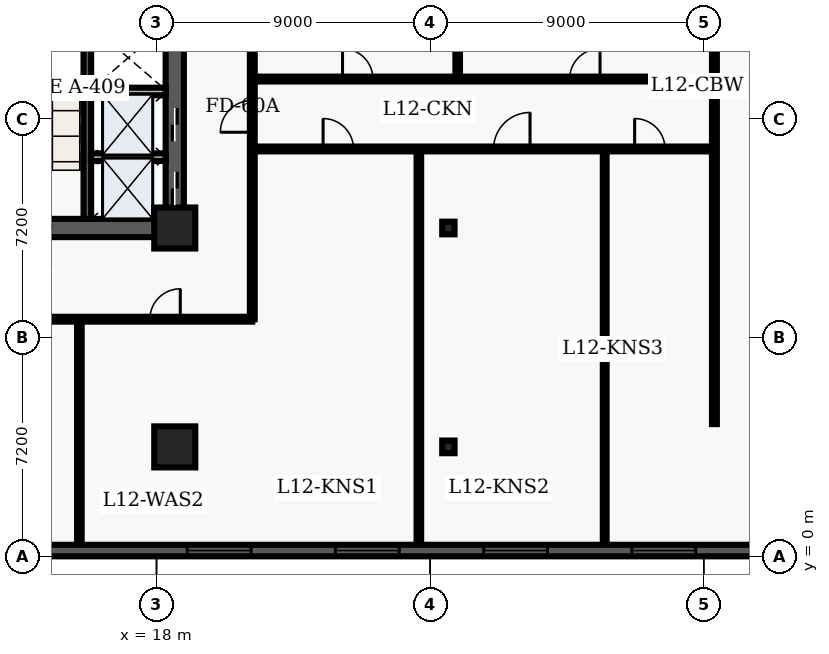
"""IFC4 building model, lengths in metres.
Left out: names, types, materials, properties, quantities, classifications, styles, units other than length and angle.
Written with IfcOpenShell. Run it as: python <this file> out.ifc"""

import sys

from ifc_helpers import new_model, entity, si_unit, converted_unit, direction, frame, origin_with_axes, origin_2d_with_axis, place, context, subcontext, project, spatial, polyline, rectangle, i_section, outline, extrude, element, fill, save


model = new_model("IFC4")
c1 = context("Model", 3, precision=1e-05, world=origin_with_axes(), true_north=direction((0.0, 1.0)))
c2 = subcontext(c1, "Body", "Model", "MODEL_VIEW")
j1 = project(units=[si_unit("LENGTHUNIT", "METRE"), converted_unit("PLANEANGLEUNIT", "DEGREE", entity("IfcPlaneAngleMeasure", 0.017), si_unit("PLANEANGLEUNIT", "RADIAN"), dimensions=[0, 0, 0, 0, 0, 0, 0])], contexts=[c1])
p1 = place(None, origin_with_axes())
s1 = spatial("IfcSite", under=j1, at=p1, CompositionType="ELEMENT")
p2 = place(p1, origin_with_axes())
s2 = spatial("IfcBuilding", under=s1, at=p2, CompositionType="ELEMENT")
p3 = place(p2, frame((0.0, 0.0, 52.2), z_axis=(0.0, 0.0, 1.0), x_axis=(1.0, 0.0, 0.0)))
s3 = spatial("IfcBuildingStorey", under=s2, at=p3, CompositionType="ELEMENT", Elevation=52.2)
p4 = place(p3, frame((11.4, 10.8, 0.0), z_axis=(0.0, 0.0, 1.0), x_axis=(1.0, 0.0, 0.0)))
e1 = element("IfcWall", 1, at=p4, inside=s3, PredefinedType="SHEAR", context=c2, shape_type="SweptSolid", body=[
    extrude(outline(polyline([(0.0, -0.3), (7.2, -0.3), (7.2, 0.3), (0.0, 0.3), (0.0, -0.3)])), origin_with_axes(), (0.0, 0.0, 1.0), 3.66),
])
p5 = place(p4, frame((2.625, 0.0, 0.0), z_axis=(0.0, 0.0, 1.0), x_axis=(1.0, 0.0, 0.0)))
e2 = element("IfcOpeningElement", 2, at=p5, cuts=e1, PredefinedType="OPENING", context=c2, shape_type="SweptSolid", body=[
    extrude(rectangle(XDim=1.05, YDim=0.62, at=origin_2d_with_axis()), origin_with_axes(), (0.0, 0.0, 1.0), 2.15),
])
p6 = place(p3, frame((18.6, 10.8, 0.0), z_axis=(0.0, 0.0, 1.0), x_axis=(0.0, 1.0, 0.0)))
e3 = element("IfcWall", 3, at=p6, inside=s3, PredefinedType="SHEAR", context=c2, shape_type="SweptSolid", body=[
    extrude(outline(polyline([(0.0, -0.3), (13.5, -0.3), (13.5, 0.3), (0.0, 0.3), (0.0, -0.3)])), origin_with_axes(), (0.0, 0.0, 1.0), 3.66),
])
p7 = place(p6, frame((1.3, 0.0, 0.0), z_axis=(0.0, 0.0, 1.0), x_axis=(1.0, 0.0, 0.0)))
e4 = element("IfcOpeningElement", 4, at=p7, cuts=e3, PredefinedType="OPENING", context=c2, shape_type="SweptSolid", body=[
    extrude(rectangle(XDim=1.1, YDim=0.62, at=origin_2d_with_axis()), origin_with_axes(), (0.0, 0.0, 1.0), 2.15),
])
p8 = place(p6, frame((3.4, 0.0, 0.0), z_axis=(0.0, 0.0, 1.0), x_axis=(1.0, 0.0, 0.0)))
e5 = element("IfcOpeningElement", 5, at=p8, cuts=e3, PredefinedType="OPENING", context=c2, shape_type="SweptSolid", body=[
    extrude(rectangle(XDim=1.1, YDim=0.62, at=origin_2d_with_axis()), origin_with_axes(), (0.0, 0.0, 1.0), 2.15),
])
p9 = place(p6, frame((11.125, 0.0, 0.0), z_axis=(0.0, 0.0, 1.0), x_axis=(1.0, 0.0, 0.0)))
e6 = element("IfcOpeningElement", 6, at=p9, cuts=e3, PredefinedType="OPENING", context=c2, shape_type="SweptSolid", body=[
    extrude(rectangle(XDim=1.05, YDim=0.62, at=origin_2d_with_axis()), origin_with_axes(), (0.0, 0.0, 1.0), 2.15),
])
p10 = place(p3, frame((15.725, 11.1, 0.0), z_axis=(0.0, 0.0, 1.0), x_axis=(0.0, 1.0, 0.0)))
e7 = element("IfcWall", 7, at=p10, inside=s3, PredefinedType="SHEAR", context=c2, shape_type="SweptSolid", body=[
    extrude(outline(polyline([(0.0, -0.125), (8.6, -0.125), (8.6, 0.125), (0.0, 0.125), (0.0, -0.125)])), origin_with_axes(), (0.0, 0.0, 1.0), 3.66),
])
for number, where, z_axis, x_axis in (
    (8, (18.6, 3.6, 0.0), (0.0, 0.0, 1.0), (1.0, 0.0, 0.0)),
    (9, (18.6, 10.8, 0.0), (0.0, 0.0, 1.0), (1.0, 0.0, 0.0)),
):
    element("IfcColumn", number, at=place(p3, frame(where, z_axis=z_axis, x_axis=x_axis)), inside=s3, PredefinedType="COLUMN", context=c2, shape_type="SweptSolid", body=[
        extrude(rectangle(XDim=1.35, YDim=1.35, at=origin_2d_with_axis()), origin_with_axes(), (0.0, 0.0, 1.0), 3.9),
    ])
for number, where, z_axis, x_axis in (
    (10, (27.6, 3.6, 0.0), (0.0, 0.0, 1.0), (1.0, 0.0, 0.0)),
    (11, (27.6, 10.8, 0.0), (0.0, 0.0, 1.0), (1.0, 0.0, 0.0)),
):
    element("IfcColumn", number, at=place(p3, frame(where, z_axis=z_axis, x_axis=x_axis)), inside=s3, PredefinedType="COLUMN", context=c2, shape_type="SweptSolid", body=[
        extrude(i_section(OverallWidth=0.406, OverallDepth=0.416, WebThickness=0.03, FlangeThickness=0.048, FilletRadius=0.022, at=origin_2d_with_axis()), origin_with_axes(), (0.0, 0.0, 1.0), 3.9),
    ])
for number, where, z_axis, x_axis in (
    (12, (15.84, 13.13, 0.0), (0.0, 0.0, 1.0), (1.0, 0.0, 0.0)),
    (13, (15.84, 15.29, 0.0), (0.0, 0.0, 1.0), (1.0, 0.0, 0.0)),
):
    element("IfcWall", number, at=place(p3, frame(where, z_axis=z_axis, x_axis=x_axis)), inside=s3, PredefinedType="SOLIDWALL", context=c2, shape_type="SweptSolid", body=[
        extrude(outline(polyline([(0.0, -0.125), (2.46, -0.125), (2.46, 0.125), (0.0, 0.125), (0.0, -0.125)])), origin_with_axes(), (0.0, 0.0, 1.0), 2.7),
    ])
p11 = place(p3, frame((2.6, 7.8, 0.0), z_axis=(0.0, 0.0, 1.0), x_axis=(1.0, 0.0, 0.0)))
e14 = element("IfcWall", 14, at=p11, inside=s3, PredefinedType="PARTITIONING", context=c2, shape_type="SweptSolid", body=[
    extrude(outline(polyline([(0.0, -0.08), (18.55, -0.08), (18.55, 0.08), (0.0, 0.08), (0.0, -0.08)])), origin_with_axes(), (0.0, 0.0, 1.0), 2.7),
])
p12 = place(p11, frame((6.426, 0.0, 0.0), z_axis=(0.0, 0.0, 1.0), x_axis=(1.0, 0.0, 0.0)))
e15 = element("IfcOpeningElement", 15, at=p12, cuts=e14, PredefinedType="OPENING", context=c2, shape_type="SweptSolid", body=[
    extrude(rectangle(XDim=1.2, YDim=0.18, at=origin_2d_with_axis()), origin_with_axes(), (0.0, 0.0, 1.0), 2.2),
])
p13 = place(p11, frame((15.681, 0.0, 0.0), z_axis=(0.0, 0.0, 1.0), x_axis=(1.0, 0.0, 0.0)))
e16 = element("IfcOpeningElement", 16, at=p13, cuts=e14, PredefinedType="OPENING", context=c2, shape_type="SweptSolid", body=[
    extrude(rectangle(XDim=1.0, YDim=0.18, at=origin_2d_with_axis()), origin_with_axes(), (0.0, 0.0, 1.0), 2.15),
])
p14 = place(p3, frame((21.15, 7.8, 0.0), z_axis=(0.0, 0.0, 1.0), x_axis=(0.0, 1.0, 0.0)))
e17 = element("IfcWall", 17, at=p14, inside=s3, PredefinedType="PARTITIONING", context=c2, shape_type="SweptSolid", body=[
    extrude(outline(polyline([(0.0, -0.08), (32.7, -0.08), (32.7, 0.08), (0.0, 0.08), (0.0, -0.08)])), origin_with_axes(), (0.0, 0.0, 1.0), 2.7),
])
p15 = place(p14, frame((6.675, 0.0, 0.0), z_axis=(0.0, 0.0, 1.0), x_axis=(1.0, 0.0, 0.0)))
e18 = element("IfcOpeningElement", 18, at=p15, cuts=e17, PredefinedType="OPENING", context=c2, shape_type="SweptSolid", body=[
    extrude(rectangle(XDim=1.05, YDim=0.18, at=origin_2d_with_axis()), origin_with_axes(), (0.0, 0.0, 1.0), 2.15),
])
p16 = place(p3, frame((15.463, 0.36, 0.0), z_axis=(0.0, 0.0, 1.0), x_axis=(0.0, 1.0, 0.0)))
e19 = element("IfcWall", 19, at=p16, inside=s3, PredefinedType="PARTITIONING", context=c2, shape_type="SweptSolid", body=[
    extrude(outline(polyline([(0.0, -0.075), (7.34, -0.075), (7.34, 0.075), (0.0, 0.075), (0.0, -0.075)])), origin_with_axes(), (0.0, 0.0, 1.0), 2.7),
])
p17 = place(p3, frame((21.15, 13.4, 0.0), z_axis=(0.0, 0.0, 1.0), x_axis=(1.0, 0.0, 0.0)))
e20 = element("IfcWall", 20, at=p17, inside=s3, PredefinedType="PARTITIONING", context=c2, shape_type="SweptSolid", body=[
    extrude(outline(polyline([(0.0, -0.08), (15.2, -0.08), (15.2, 0.08), (0.0, 0.08), (0.0, -0.08)])), origin_with_axes(), (0.0, 0.0, 1.0), 2.7),
])
p18 = place(p17, frame((2.829, 0.0, 0.0), z_axis=(0.0, 0.0, 1.0), x_axis=(1.0, 0.0, 0.0)))
e21 = element("IfcOpeningElement", 21, at=p18, cuts=e20, PredefinedType="OPENING", context=c2, shape_type="SweptSolid", body=[
    extrude(rectangle(XDim=1.0, YDim=0.18, at=origin_2d_with_axis()), origin_with_axes(), (0.0, 0.0, 1.0), 2.15),
])
p19 = place(p17, frame((8.536, 0.0, 0.0), z_axis=(0.0, 0.0, 1.0), x_axis=(1.0, 0.0, 0.0)))
e22 = element("IfcOpeningElement", 22, at=p19, cuts=e20, PredefinedType="OPENING", context=c2, shape_type="SweptSolid", body=[
    extrude(rectangle(XDim=1.2, YDim=0.18, at=origin_2d_with_axis()), origin_with_axes(), (0.0, 0.0, 1.0), 2.2),
])
p20 = place(p17, frame((13.076, 0.0, 0.0), z_axis=(0.0, 0.0, 1.0), x_axis=(1.0, 0.0, 0.0)))
e23 = element("IfcOpeningElement", 23, at=p20, cuts=e20, PredefinedType="OPENING", context=c2, shape_type="SweptSolid", body=[
    extrude(rectangle(XDim=1.0, YDim=0.18, at=origin_2d_with_axis()), origin_with_axes(), (0.0, 0.0, 1.0), 2.15),
])
p21 = place(p3, frame((21.15, 15.7, 0.0), z_axis=(0.0, 0.0, 1.0), x_axis=(1.0, 0.0, 0.0)))
e24 = element("IfcWall", 24, at=p21, inside=s3, PredefinedType="PARTITIONING", context=c2, shape_type="SweptSolid", body=[
    extrude(outline(polyline([(0.0, -0.08), (15.2, -0.08), (15.2, 0.08), (0.0, 0.08), (0.0, -0.08)])), origin_with_axes(), (0.0, 0.0, 1.0), 2.7),
])
p22 = place(p21, frame((3.468, 0.0, 0.0), z_axis=(0.0, 0.0, 1.0), x_axis=(1.0, 0.0, 0.0)))
e25 = element("IfcOpeningElement", 25, at=p22, cuts=e24, PredefinedType="OPENING", context=c2, shape_type="SweptSolid", body=[
    extrude(rectangle(XDim=1.0, YDim=0.18, at=origin_2d_with_axis()), origin_with_axes(), (0.0, 0.0, 1.0), 2.15),
])
p23 = place(p21, frame((10.938, 0.0, 0.0), z_axis=(0.0, 0.0, 1.0), x_axis=(1.0, 0.0, 0.0)))
e26 = element("IfcOpeningElement", 26, at=p23, cuts=e24, PredefinedType="OPENING", context=c2, shape_type="SweptSolid", body=[
    extrude(rectangle(XDim=1.0, YDim=0.18, at=origin_2d_with_axis()), origin_with_axes(), (0.0, 0.0, 1.0), 2.15),
])
p24 = place(p3, frame((36.35, 4.35, 0.0), z_axis=(0.0, 0.0, 1.0), x_axis=(0.0, 1.0, 0.0)))
e27 = element("IfcWall", 27, at=p24, inside=s3, PredefinedType="PARTITIONING", context=c2, shape_type="SweptSolid", body=[
    extrude(outline(polyline([(0.0, -0.08), (16.95, -0.08), (16.95, 0.08), (0.0, 0.08), (0.0, -0.08)])), origin_with_axes(), (0.0, 0.0, 1.0), 2.7),
])
p25 = place(p3, frame((26.629, 0.36, 0.0), z_axis=(0.0, 0.0, 1.0), x_axis=(0.0, 1.0, 0.0)))
e28 = element("IfcWall", 28, at=p25, inside=s3, PredefinedType="PARTITIONING", context=c2, shape_type="SweptSolid", body=[
    extrude(outline(polyline([(0.0, -0.075), (12.92, -0.075), (12.92, 0.075), (0.0, 0.075), (0.0, -0.075)])), origin_with_axes(), (0.0, 0.0, 1.0), 2.7),
])
p26 = place(p3, frame((32.742, 0.36, 0.0), z_axis=(0.0, 0.0, 1.0), x_axis=(0.0, 1.0, 0.0)))
e29 = element("IfcWall", 29, at=p26, inside=s3, PredefinedType="PARTITIONING", context=c2, shape_type="SweptSolid", body=[
    extrude(outline(polyline([(0.0, -0.062), (12.92, -0.062), (12.92, 0.062), (0.0, 0.062), (0.0, -0.062)])), origin_with_axes(), (0.0, 0.0, 1.0), 2.7),
])
p27 = place(p3, frame((27.906, 15.82, 0.0), z_axis=(0.0, 0.0, 1.0), x_axis=(0.0, 1.0, 0.0)))
e30 = element("IfcWall", 30, at=p27, inside=s3, PredefinedType="PARTITIONING", context=c2, shape_type="SweptSolid", body=[
    extrude(outline(polyline([(0.0, -0.075), (5.405, -0.075), (5.405, 0.075), (0.0, 0.075), (0.0, -0.075)])), origin_with_axes(), (0.0, 0.0, 1.0), 2.7),
])
p28 = place(p3, frame((57.22, 0.19, 0.0), z_axis=(0.0, 0.0, 1.0), x_axis=(-1.0, 0.0, 0.0)))
e31 = element("IfcWall", 31, at=p28, inside=s3, PredefinedType="SOLIDWALL", context=c2, shape_type="SweptSolid", body=[
    extrude(outline(polyline([(0.0, -0.19), (54.82, -0.19), (54.82, 0.19), (0.0, 0.19), (0.0, -0.19)])), origin_with_axes(), (0.0, 0.0, 1.0), 3.66),
])
p29 = place(p28, frame((3.037, 0.0, 0.45), z_axis=(0.0, 0.0, 1.0), x_axis=(1.0, 0.0, 0.0)))
e32 = element("IfcOpeningElement", 32, at=p29, cuts=e31, PredefinedType="OPENING", context=c2, shape_type="SweptSolid", body=[
    extrude(rectangle(XDim=2.1, YDim=0.4, at=origin_2d_with_axis()), origin_with_axes(), (0.0, 0.0, 1.0), 2.2),
])
p30 = place(p28, frame((7.912, 0.0, 0.45), z_axis=(0.0, 0.0, 1.0), x_axis=(1.0, 0.0, 0.0)))
e33 = element("IfcOpeningElement", 33, at=p30, cuts=e31, PredefinedType="OPENING", context=c2, shape_type="SweptSolid", body=[
    extrude(rectangle(XDim=2.1, YDim=0.4, at=origin_2d_with_axis()), origin_with_axes(), (0.0, 0.0, 1.0), 2.2),
])
p31 = place(p28, frame((12.786, 0.0, 0.45), z_axis=(0.0, 0.0, 1.0), x_axis=(1.0, 0.0, 0.0)))
e34 = element("IfcOpeningElement", 34, at=p31, cuts=e31, PredefinedType="OPENING", context=c2, shape_type="SweptSolid", body=[
    extrude(rectangle(XDim=2.1, YDim=0.4, at=origin_2d_with_axis()), origin_with_axes(), (0.0, 0.0, 1.0), 2.2),
])
p32 = place(p28, frame((17.661, 0.0, 0.45), z_axis=(0.0, 0.0, 1.0), x_axis=(1.0, 0.0, 0.0)))
e35 = element("IfcOpeningElement", 35, at=p32, cuts=e31, PredefinedType="OPENING", context=c2, shape_type="SweptSolid", body=[
    extrude(rectangle(XDim=2.1, YDim=0.4, at=origin_2d_with_axis()), origin_with_axes(), (0.0, 0.0, 1.0), 2.2),
])
p33 = place(p28, frame((22.535, 0.0, 0.45), z_axis=(0.0, 0.0, 1.0), x_axis=(1.0, 0.0, 0.0)))
e36 = element("IfcOpeningElement", 36, at=p33, cuts=e31, PredefinedType="OPENING", context=c2, shape_type="SweptSolid", body=[
    extrude(rectangle(XDim=2.1, YDim=0.4, at=origin_2d_with_axis()), origin_with_axes(), (0.0, 0.0, 1.0), 2.2),
])
p34 = place(p28, frame((27.41, 0.0, 0.45), z_axis=(0.0, 0.0, 1.0), x_axis=(1.0, 0.0, 0.0)))
e37 = element("IfcOpeningElement", 37, at=p34, cuts=e31, PredefinedType="OPENING", context=c2, shape_type="SweptSolid", body=[
    extrude(rectangle(XDim=2.1, YDim=0.4, at=origin_2d_with_axis()), origin_with_axes(), (0.0, 0.0, 1.0), 2.2),
])
p35 = place(p28, frame((32.285, 0.0, 0.45), z_axis=(0.0, 0.0, 1.0), x_axis=(1.0, 0.0, 0.0)))
e38 = element("IfcOpeningElement", 38, at=p35, cuts=e31, PredefinedType="OPENING", context=c2, shape_type="SweptSolid", body=[
    extrude(rectangle(XDim=2.1, YDim=0.4, at=origin_2d_with_axis()), origin_with_axes(), (0.0, 0.0, 1.0), 2.2),
])
p36 = place(p28, frame((37.159, 0.0, 0.45), z_axis=(0.0, 0.0, 1.0), x_axis=(1.0, 0.0, 0.0)))
e39 = element("IfcOpeningElement", 39, at=p36, cuts=e31, PredefinedType="OPENING", context=c2, shape_type="SweptSolid", body=[
    extrude(rectangle(XDim=2.1, YDim=0.4, at=origin_2d_with_axis()), origin_with_axes(), (0.0, 0.0, 1.0), 2.2),
])
p37 = place(p28, frame((46.908, 0.0, 0.45), z_axis=(0.0, 0.0, 1.0), x_axis=(1.0, 0.0, 0.0)))
e40 = element("IfcOpeningElement", 40, at=p37, cuts=e31, PredefinedType="OPENING", context=c2, shape_type="SweptSolid", body=[
    extrude(rectangle(XDim=2.1, YDim=0.4, at=origin_2d_with_axis()), origin_with_axes(), (0.0, 0.0, 1.0), 2.2),
])
p38 = place(p28, frame((51.783, 0.0, 0.45), z_axis=(0.0, 0.0, 1.0), x_axis=(1.0, 0.0, 0.0)))
e41 = element("IfcOpeningElement", 41, at=p38, cuts=e31, PredefinedType="OPENING", context=c2, shape_type="SweptSolid", body=[
    extrude(rectangle(XDim=2.1, YDim=0.4, at=origin_2d_with_axis()), origin_with_axes(), (0.0, 0.0, 1.0), 2.2),
])
p39 = place(p6, frame((1.3, 0.0, 0.0), z_axis=(0.0, 0.0, 1.0), x_axis=(1.0, 0.0, 0.0)))
e42 = element("IfcDoor", 42, at=p39, inside=s3, OperationType="SLIDING_TO_LEFT", PredefinedType="DOOR", context=c2, shape_type="SweptSolid", body=[
    extrude(rectangle(XDim=1.1, YDim=0.09, at=origin_2d_with_axis()), origin_with_axes(), (0.0, 0.0, 1.0), 2.15),
])
fill(e4, e42)
p40 = place(p6, frame((3.4, 0.0, 0.0), z_axis=(0.0, 0.0, 1.0), x_axis=(1.0, 0.0, 0.0)))
e43 = element("IfcDoor", 43, at=p40, inside=s3, OperationType="SLIDING_TO_RIGHT", PredefinedType="DOOR", context=c2, shape_type="SweptSolid", body=[
    extrude(rectangle(XDim=1.1, YDim=0.09, at=origin_2d_with_axis()), origin_with_axes(), (0.0, 0.0, 1.0), 2.15),
])
fill(e5, e43)
p41 = place(p11, frame((15.681, 0.0, 0.0), z_axis=(0.0, 0.0, 1.0), x_axis=(1.0, 0.0, 0.0)))
e44 = element("IfcDoor", 44, at=p41, inside=s3, OperationType="SINGLE_SWING_RIGHT", PredefinedType="DOOR", context=c2, shape_type="SweptSolid", body=[
    extrude(rectangle(XDim=1.0, YDim=0.09, at=origin_2d_with_axis()), origin_with_axes(), (0.0, 0.0, 1.0), 2.15),
])
fill(e16, e44)
p42 = place(p14, frame((6.675, 0.0, 0.0), z_axis=(0.0, 0.0, 1.0), x_axis=(1.0, 0.0, 0.0)))
e45 = element("IfcDoor", 45, at=p42, inside=s3, OperationType="SINGLE_SWING_LEFT", PredefinedType="DOOR", context=c2, shape_type="SweptSolid", body=[
    extrude(rectangle(XDim=1.05, YDim=0.09, at=origin_2d_with_axis()), origin_with_axes(), (0.0, 0.0, 1.0), 2.15),
])
fill(e18, e45)
p43 = place(p17, frame((2.829, 0.0, 0.0), z_axis=(0.0, 0.0, 1.0), x_axis=(1.0, 0.0, 0.0)))
e46 = element("IfcDoor", 46, at=p43, inside=s3, OperationType="SINGLE_SWING_LEFT", PredefinedType="DOOR", context=c2, shape_type="SweptSolid", body=[
    extrude(rectangle(XDim=1.0, YDim=0.09, at=origin_2d_with_axis()), origin_with_axes(), (0.0, 0.0, 1.0), 2.15),
])
fill(e21, e46)
p44 = place(p17, frame((8.536, 0.0, 0.0), z_axis=(0.0, 0.0, 1.0), x_axis=(1.0, 0.0, 0.0)))
e47 = element("IfcDoor", 47, at=p44, inside=s3, OperationType="SINGLE_SWING_RIGHT", PredefinedType="DOOR", context=c2, shape_type="SweptSolid", body=[
    extrude(rectangle(XDim=1.2, YDim=0.09, at=origin_2d_with_axis()), origin_with_axes(), (0.0, 0.0, 1.0), 2.2),
])
fill(e22, e47)
p45 = place(p17, frame((13.076, 0.0, 0.0), z_axis=(0.0, 0.0, 1.0), x_axis=(1.0, 0.0, 0.0)))
e48 = element("IfcDoor", 48, at=p45, inside=s3, OperationType="SINGLE_SWING_LEFT", PredefinedType="DOOR", context=c2, shape_type="SweptSolid", body=[
    extrude(rectangle(XDim=1.0, YDim=0.09, at=origin_2d_with_axis()), origin_with_axes(), (0.0, 0.0, 1.0), 2.15),
])
fill(e23, e48)
p46 = place(p21, frame((3.468, 0.0, 0.0), z_axis=(0.0, 0.0, 1.0), x_axis=(1.0, 0.0, 0.0)))
e49 = element("IfcDoor", 49, at=p46, inside=s3, OperationType="SINGLE_SWING_LEFT", PredefinedType="DOOR", context=c2, shape_type="SweptSolid", body=[
    extrude(rectangle(XDim=1.0, YDim=0.09, at=origin_2d_with_axis()), origin_with_axes(), (0.0, 0.0, 1.0), 2.15),
])
fill(e25, e49)
p47 = place(p21, frame((10.938, 0.0, 0.0), z_axis=(0.0, 0.0, 1.0), x_axis=(1.0, 0.0, 0.0)))
e50 = element("IfcDoor", 50, at=p47, inside=s3, OperationType="SINGLE_SWING_RIGHT", PredefinedType="DOOR", context=c2, shape_type="SweptSolid", body=[
    extrude(rectangle(XDim=1.0, YDim=0.09, at=origin_2d_with_axis()), origin_with_axes(), (0.0, 0.0, 1.0), 2.15),
])
fill(e26, e50)
p48 = place(p28, frame((22.535, 0.0, 0.45), z_axis=(0.0, 0.0, 1.0), x_axis=(1.0, 0.0, 0.0)))
e51 = element("IfcWindow", 51, at=p48, inside=s3, PredefinedType="WINDOW", context=c2, shape_type="SweptSolid", body=[
    extrude(rectangle(XDim=2.1, YDim=0.09, at=origin_2d_with_axis()), origin_with_axes(), (0.0, 0.0, 1.0), 2.2),
])
fill(e36, e51)
p49 = place(p28, frame((27.41, 0.0, 0.45), z_axis=(0.0, 0.0, 1.0), x_axis=(1.0, 0.0, 0.0)))
e52 = element("IfcWindow", 52, at=p49, inside=s3, PredefinedType="WINDOW", context=c2, shape_type="SweptSolid", body=[
    extrude(rectangle(XDim=2.1, YDim=0.09, at=origin_2d_with_axis()), origin_with_axes(), (0.0, 0.0, 1.0), 2.2),
])
fill(e37, e52)
p50 = place(p28, frame((32.285, 0.0, 0.45), z_axis=(0.0, 0.0, 1.0), x_axis=(1.0, 0.0, 0.0)))
e53 = element("IfcWindow", 53, at=p50, inside=s3, PredefinedType="WINDOW", context=c2, shape_type="SweptSolid", body=[
    extrude(rectangle(XDim=2.1, YDim=0.09, at=origin_2d_with_axis()), origin_with_axes(), (0.0, 0.0, 1.0), 2.2),
])
fill(e38, e53)
p51 = place(p28, frame((37.159, 0.0, 0.45), z_axis=(0.0, 0.0, 1.0), x_axis=(1.0, 0.0, 0.0)))
e54 = element("IfcWindow", 54, at=p51, inside=s3, PredefinedType="WINDOW", context=c2, shape_type="SweptSolid", body=[
    extrude(rectangle(XDim=2.1, YDim=0.09, at=origin_2d_with_axis()), origin_with_axes(), (0.0, 0.0, 1.0), 2.2),
])
fill(e39, e54)
save(model, sys.argv[1])
